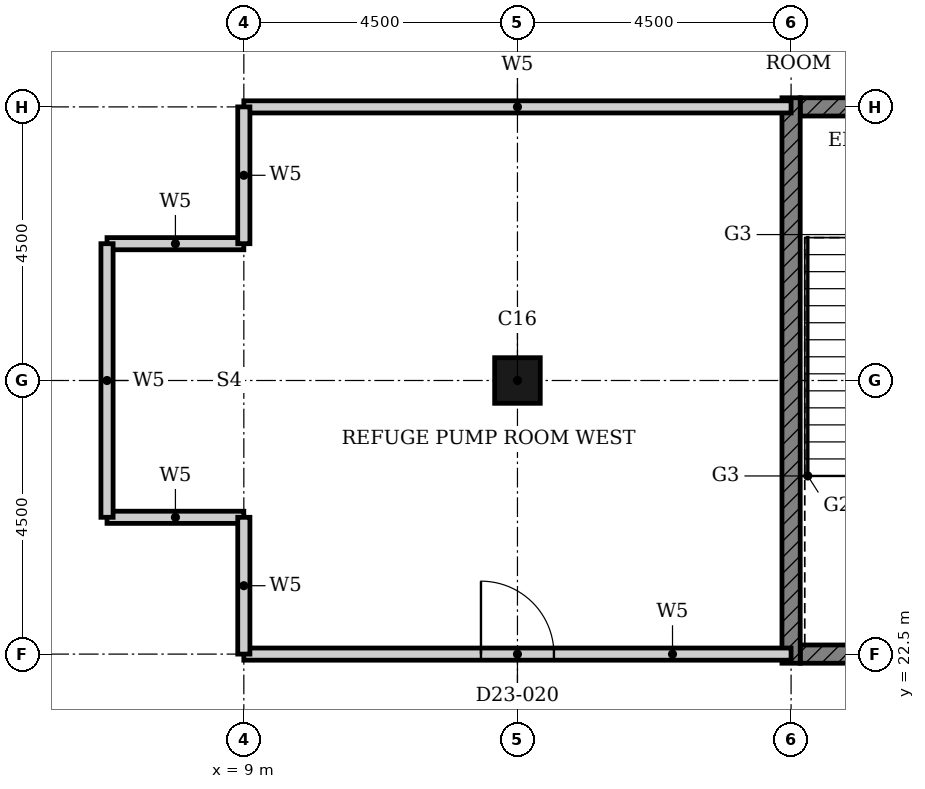
"""IFC4 building model, lengths in metres.
Left out: names, types, materials, properties, quantities, classifications, styles, units other than length and angle.
Written with IfcOpenShell. Run it as: python <this file> out.ifc"""

import sys

from ifc_helpers import new_model, si_unit, direction, frame, frame_2d, origin, origin_2d, place, context, subcontext, project, spatial, rectangle, hollow_rectangle, extrude, element, fill, save


model = new_model("IFC4")
c1 = context("Model", 3, precision=1e-05, world=origin(), true_north=direction((0.0, 1.0)))
c2 = subcontext(c1, "Body", "Model", "MODEL_VIEW")
j1 = project(units=[si_unit("LENGTHUNIT", "METRE"), si_unit("PLANEANGLEUNIT", "RADIAN")], contexts=[c1])
p1 = place(None, origin())
s1 = spatial("IfcSite", under=j1, at=p1, CompositionType="ELEMENT")
p2 = place(p1, origin())
s2 = spatial("IfcBuilding", under=s1, at=p2, CompositionType="ELEMENT")
p3 = place(p2, frame((0.0, 0.0, 96.0)))
s3 = spatial("IfcBuildingStorey", under=s2, at=p3, CompositionType="ELEMENT", Elevation=96.0)
p4 = place(p3, frame((13.5, 27.0, 0.0), z_axis=(0.0, 0.0, 1.0), x_axis=(1.0, 0.0, 0.0)))
e1 = element("IfcColumn", 1, at=p4, inside=s3, PredefinedType="COLUMN", context=c2, shape_type="SweptSolid", body=[
    extrude(hollow_rectangle(XDim=0.75, YDim=0.75, WallThickness=0.024, at=origin_2d()), origin(), (0.0, 0.0, 1.0), 4.8),
])
p5 = place(p3, frame((18.15, 22.5, 0.0), z_axis=(0.0, 0.0, 1.0), x_axis=(1.0, 0.0, 0.0)))
e2 = element("IfcWall", 2, at=p5, inside=s3, PredefinedType="SHEAR", context=c2, shape_type="SweptSolid", body=[
    extrude(rectangle(XDim=4.225, YDim=0.3, at=frame_2d((2.113, 0.0))), origin(), (0.0, 0.0, 1.0), 4.5),
])
p6 = place(p3, frame((18.15, 31.5, 0.0), z_axis=(0.0, 0.0, 1.0), x_axis=(1.0, 0.0, 0.0)))
e3 = element("IfcWall", 3, at=p6, inside=s3, PredefinedType="SHEAR", context=c2, shape_type="SweptSolid", body=[
    extrude(rectangle(XDim=6.797, YDim=0.3, at=frame_2d((3.398, 0.0))), origin(), (0.0, 0.0, 1.0), 4.5),
])
p7 = place(p6, frame((4.736, 0.0, 0.0)))
e4 = element("IfcOpeningElement", 4, at=p7, cuts=e3, PredefinedType="OPENING", context=c2, shape_type="SweptSolid", body=[
    extrude(rectangle(XDim=1.8, YDim=2.1, at=frame_2d((0.9, 1.05))), frame((0.0, 0.16, 0.0), z_axis=(0.0, -1.0, 0.0), x_axis=(1.0, 0.0, 0.0)), (0.0, 0.0, 1.0), 0.32),
])
p8 = place(p3, frame((18.0, 22.35, 0.0), z_axis=(0.0, 0.0, 1.0), x_axis=(0.0, 1.0, 0.0)))
e5 = element("IfcWall", 5, at=p8, inside=s3, PredefinedType="SHEAR", context=c2, shape_type="SweptSolid", body=[
    extrude(rectangle(XDim=9.3, YDim=0.3, at=frame_2d((4.65, 0.0))), origin(), (0.0, 0.0, 1.0), 4.5),
])
p9 = place(p3, frame((9.0, 22.5, 0.0), z_axis=(0.0, 0.0, 1.0), x_axis=(1.0, 0.0, 0.0)))
e6 = element("IfcWall", 6, at=p9, inside=s3, PredefinedType="PARTITIONING", context=c2, shape_type="SweptSolid", body=[
    extrude(rectangle(XDim=9.0, YDim=0.2, at=frame_2d((4.5, 0.0))), origin(), (0.0, 0.0, 1.0), 3.78),
])
p10 = place(p9, frame((3.9, 0.0, 0.0)))
e7 = element("IfcOpeningElement", 7, at=p10, cuts=e6, PredefinedType="OPENING", context=c2, shape_type="SweptSolid", body=[
    extrude(rectangle(XDim=1.2, YDim=2.1, at=frame_2d((0.6, 1.05))), frame((0.0, 0.11, 0.0), z_axis=(0.0, -1.0, 0.0), x_axis=(1.0, 0.0, 0.0)), (0.0, 0.0, 1.0), 0.22),
])
for number, where, z_axis, x_axis in (
    (8, (6.75, 24.75, 0.0), (0.0, 0.0, 1.0), (1.0, 0.0, 0.0)),
    (9, (6.75, 29.25, 0.0), (0.0, 0.0, 1.0), (1.0, 0.0, 0.0)),
):
    element("IfcWall", number, at=place(p3, frame(where, z_axis=z_axis, x_axis=x_axis)), inside=s3, PredefinedType="PARTITIONING", context=c2, shape_type="SweptSolid", body=[
        extrude(rectangle(XDim=2.25, YDim=0.2, at=frame_2d((1.125, 0.0))), origin(), (0.0, 0.0, 1.0), 4.5),
    ])
p11 = place(p3, frame((9.0, 31.5, 0.0), z_axis=(0.0, 0.0, 1.0), x_axis=(1.0, 0.0, 0.0)))
e10 = element("IfcWall", 10, at=p11, inside=s3, PredefinedType="PARTITIONING", context=c2, shape_type="SweptSolid", body=[
    extrude(rectangle(XDim=9.0, YDim=0.2, at=frame_2d((4.5, 0.0))), origin(), (0.0, 0.0, 1.0), 3.78),
])
p12 = place(p3, frame((6.75, 24.75, 0.0), z_axis=(0.0, 0.0, 1.0), x_axis=(0.0, 1.0, 0.0)))
e11 = element("IfcWall", 11, at=p12, inside=s3, PredefinedType="PARTITIONING", context=c2, shape_type="SweptSolid", body=[
    extrude(rectangle(XDim=4.5, YDim=0.2, at=frame_2d((2.25, 0.0))), origin(), (0.0, 0.0, 1.0), 4.5),
])
for number, where, z_axis, x_axis in (
    (12, (9.0, 22.5, 0.0), (0.0, 0.0, 1.0), (0.0, 1.0, 0.0)),
    (13, (9.0, 29.25, 0.0), (0.0, 0.0, 1.0), (0.0, 1.0, 0.0)),
):
    element("IfcWall", number, at=place(p3, frame(where, z_axis=z_axis, x_axis=x_axis)), inside=s3, PredefinedType="PARTITIONING", context=c2, shape_type="SweptSolid", body=[
        extrude(rectangle(XDim=2.25, YDim=0.2, at=frame_2d((1.125, 0.0))), origin(), (0.0, 0.0, 1.0), 4.5),
    ])
p13 = place(p10, origin())
e14 = element("IfcDoor", 14, at=p13, inside=s3, OperationType="SINGLE_SWING_RIGHT", PredefinedType="DOOR", context=c2, shape_type="SweptSolid", body=[
    extrude(rectangle(XDim=1.2, YDim=2.1, at=frame_2d((0.6, 1.05))), frame((0.0, 0.025, 0.0), z_axis=(0.0, -1.0, 0.0), x_axis=(1.0, 0.0, 0.0)), (0.0, 0.0, 1.0), 0.05),
])
fill(e7, e14)
save(model, sys.argv[1])
